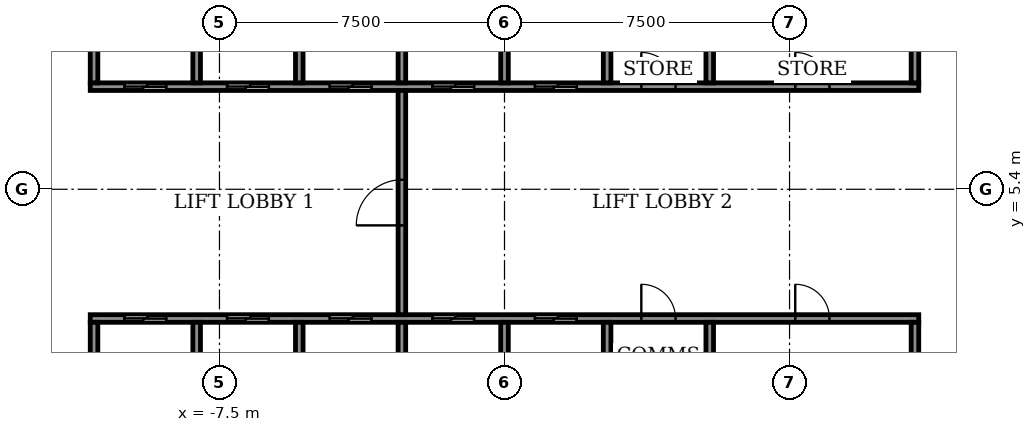
"""IFC4 building model, lengths in metres.
Left out: names, types, materials, properties, quantities, classifications, styles, units other than length and angle.
Written with IfcOpenShell. Run it as: python <this file> out.ifc"""

import sys

from ifc_helpers import new_model, si_unit, direction, frame, frame_2d, origin, place, context, subcontext, project, spatial, rectangle, extrude, element, fill, save


model = new_model("IFC4")
c1 = context("Model", 3, precision=1e-05, world=origin(), true_north=direction((0.0, 1.0)))
c2 = subcontext(c1, "Body", "Model", "MODEL_VIEW")
j1 = project(units=[si_unit("LENGTHUNIT", "METRE"), si_unit("PLANEANGLEUNIT", "RADIAN")], contexts=[c1])
p1 = place(None, origin())
s1 = spatial("IfcSite", under=j1, at=p1, CompositionType="ELEMENT")
p2 = place(p1, origin())
s2 = spatial("IfcBuilding", under=s1, at=p2, CompositionType="ELEMENT")
p3 = place(p2, frame((0.0, 0.0, 6.0)))
s3 = spatial("IfcBuildingStorey", under=s2, at=p3, CompositionType="ELEMENT", Elevation=6.0)
p4 = place(p3, frame((-10.9, 2.0, 0.0), z_axis=(0.0, 0.0, 1.0), x_axis=(1.0, 0.0, 0.0)))
e1 = element("IfcWall", 1, at=p4, inside=s3, PredefinedType="SHEAR", context=c2, shape_type="SweptSolid", body=[
    extrude(rectangle(XDim=21.8, YDim=0.2, at=frame_2d((10.9, 0.0))), origin(), (0.0, 0.0, 1.0), 4.45),
])
p5 = place(p4, frame((0.9, 0.0, 0.0)))
e2 = element("IfcOpeningElement", 2, at=p5, cuts=e1, PredefinedType="OPENING", context=c2, shape_type="SweptSolid", body=[
    extrude(rectangle(XDim=1.1, YDim=2.1, at=frame_2d((0.55, 1.05))), frame((0.0, 0.11, 0.0), z_axis=(0.0, -1.0, 0.0), x_axis=(1.0, 0.0, 0.0)), (0.0, 0.0, 1.0), 0.22),
])
p6 = place(p4, frame((3.6, 0.0, 0.0)))
e3 = element("IfcOpeningElement", 3, at=p6, cuts=e1, PredefinedType="OPENING", context=c2, shape_type="SweptSolid", body=[
    extrude(rectangle(XDim=1.1, YDim=2.1, at=frame_2d((0.55, 1.05))), frame((0.0, 0.11, 0.0), z_axis=(0.0, -1.0, 0.0), x_axis=(1.0, 0.0, 0.0)), (0.0, 0.0, 1.0), 0.22),
])
p7 = place(p4, frame((6.3, 0.0, 0.0)))
e4 = element("IfcOpeningElement", 4, at=p7, cuts=e1, PredefinedType="OPENING", context=c2, shape_type="SweptSolid", body=[
    extrude(rectangle(XDim=1.1, YDim=2.1, at=frame_2d((0.55, 1.05))), frame((0.0, 0.11, 0.0), z_axis=(0.0, -1.0, 0.0), x_axis=(1.0, 0.0, 0.0)), (0.0, 0.0, 1.0), 0.22),
])
p8 = place(p4, frame((9.0, 0.0, 0.0)))
e5 = element("IfcOpeningElement", 5, at=p8, cuts=e1, PredefinedType="OPENING", context=c2, shape_type="SweptSolid", body=[
    extrude(rectangle(XDim=1.1, YDim=2.1, at=frame_2d((0.55, 1.05))), frame((0.0, 0.11, 0.0), z_axis=(0.0, -1.0, 0.0), x_axis=(1.0, 0.0, 0.0)), (0.0, 0.0, 1.0), 0.22),
])
p9 = place(p4, frame((11.7, 0.0, 0.0)))
e6 = element("IfcOpeningElement", 6, at=p9, cuts=e1, PredefinedType="OPENING", context=c2, shape_type="SweptSolid", body=[
    extrude(rectangle(XDim=1.1, YDim=2.1, at=frame_2d((0.55, 1.05))), frame((0.0, 0.11, 0.0), z_axis=(0.0, -1.0, 0.0), x_axis=(1.0, 0.0, 0.0)), (0.0, 0.0, 1.0), 0.22),
])
p10 = place(p4, frame((14.5, 0.0, 0.0)))
e7 = element("IfcOpeningElement", 7, at=p10, cuts=e1, PredefinedType="OPENING", context=c2, shape_type="SweptSolid", body=[
    extrude(rectangle(XDim=0.9, YDim=2.1, at=frame_2d((0.45, 1.05))), frame((0.0, 0.11, 0.0), z_axis=(0.0, -1.0, 0.0), x_axis=(1.0, 0.0, 0.0)), (0.0, 0.0, 1.0), 0.22),
])
p11 = place(p4, frame((18.55, 0.0, 0.0)))
e8 = element("IfcOpeningElement", 8, at=p11, cuts=e1, PredefinedType="OPENING", context=c2, shape_type="SweptSolid", body=[
    extrude(rectangle(XDim=0.9, YDim=2.1, at=frame_2d((0.45, 1.05))), frame((0.0, 0.11, 0.0), z_axis=(0.0, -1.0, 0.0), x_axis=(1.0, 0.0, 0.0)), (0.0, 0.0, 1.0), 0.22),
])
p12 = place(p3, frame((-10.9, 8.1, 0.0), z_axis=(0.0, 0.0, 1.0), x_axis=(1.0, 0.0, 0.0)))
e9 = element("IfcWall", 9, at=p12, inside=s3, PredefinedType="SHEAR", context=c2, shape_type="SweptSolid", body=[
    extrude(rectangle(XDim=21.8, YDim=0.2, at=frame_2d((10.9, 0.0))), origin(), (0.0, 0.0, 1.0), 4.45),
])
p13 = place(p12, frame((0.9, 0.0, 0.0)))
e10 = element("IfcOpeningElement", 10, at=p13, cuts=e9, PredefinedType="OPENING", context=c2, shape_type="SweptSolid", body=[
    extrude(rectangle(XDim=1.1, YDim=2.1, at=frame_2d((0.55, 1.05))), frame((0.0, 0.11, 0.0), z_axis=(0.0, -1.0, 0.0), x_axis=(1.0, 0.0, 0.0)), (0.0, 0.0, 1.0), 0.22),
])
p14 = place(p12, frame((3.6, 0.0, 0.0)))
e11 = element("IfcOpeningElement", 11, at=p14, cuts=e9, PredefinedType="OPENING", context=c2, shape_type="SweptSolid", body=[
    extrude(rectangle(XDim=1.1, YDim=2.1, at=frame_2d((0.55, 1.05))), frame((0.0, 0.11, 0.0), z_axis=(0.0, -1.0, 0.0), x_axis=(1.0, 0.0, 0.0)), (0.0, 0.0, 1.0), 0.22),
])
p15 = place(p12, frame((6.3, 0.0, 0.0)))
e12 = element("IfcOpeningElement", 12, at=p15, cuts=e9, PredefinedType="OPENING", context=c2, shape_type="SweptSolid", body=[
    extrude(rectangle(XDim=1.1, YDim=2.1, at=frame_2d((0.55, 1.05))), frame((0.0, 0.11, 0.0), z_axis=(0.0, -1.0, 0.0), x_axis=(1.0, 0.0, 0.0)), (0.0, 0.0, 1.0), 0.22),
])
p16 = place(p12, frame((9.0, 0.0, 0.0)))
e13 = element("IfcOpeningElement", 13, at=p16, cuts=e9, PredefinedType="OPENING", context=c2, shape_type="SweptSolid", body=[
    extrude(rectangle(XDim=1.1, YDim=2.1, at=frame_2d((0.55, 1.05))), frame((0.0, 0.11, 0.0), z_axis=(0.0, -1.0, 0.0), x_axis=(1.0, 0.0, 0.0)), (0.0, 0.0, 1.0), 0.22),
])
p17 = place(p12, frame((11.7, 0.0, 0.0)))
e14 = element("IfcOpeningElement", 14, at=p17, cuts=e9, PredefinedType="OPENING", context=c2, shape_type="SweptSolid", body=[
    extrude(rectangle(XDim=1.1, YDim=2.1, at=frame_2d((0.55, 1.05))), frame((0.0, 0.11, 0.0), z_axis=(0.0, -1.0, 0.0), x_axis=(1.0, 0.0, 0.0)), (0.0, 0.0, 1.0), 0.22),
])
p18 = place(p12, frame((14.5, 0.0, 0.0)))
e15 = element("IfcOpeningElement", 15, at=p18, cuts=e9, PredefinedType="OPENING", context=c2, shape_type="SweptSolid", body=[
    extrude(rectangle(XDim=0.9, YDim=2.1, at=frame_2d((0.45, 1.05))), frame((0.0, 0.11, 0.0), z_axis=(0.0, -1.0, 0.0), x_axis=(1.0, 0.0, 0.0)), (0.0, 0.0, 1.0), 0.22),
])
p19 = place(p12, frame((18.55, 0.0, 0.0)))
e16 = element("IfcOpeningElement", 16, at=p19, cuts=e9, PredefinedType="OPENING", context=c2, shape_type="SweptSolid", body=[
    extrude(rectangle(XDim=0.9, YDim=2.1, at=frame_2d((0.45, 1.05))), frame((0.0, 0.11, 0.0), z_axis=(0.0, -1.0, 0.0), x_axis=(1.0, 0.0, 0.0)), (0.0, 0.0, 1.0), 0.22),
])
for number, where, z_axis, x_axis in (
    (17, (-10.8, -0.6, 0.0), (0.0, 0.0, 1.0), (0.0, 1.0, 0.0)),
    (18, (-8.1, -0.6, 0.0), (0.0, 0.0, 1.0), (0.0, 1.0, 0.0)),
    (19, (-5.4, -0.6, 0.0), (0.0, 0.0, 1.0), (0.0, 1.0, 0.0)),
    (20, (-2.7, -0.6, 0.0), (0.0, 0.0, 1.0), (0.0, 1.0, 0.0)),
    (21, (0.0, -0.6, 0.0), (0.0, 0.0, 1.0), (0.0, 1.0, 0.0)),
    (22, (2.7, -0.6, 0.0), (0.0, 0.0, 1.0), (0.0, 1.0, 0.0)),
):
    element("IfcWall", number, at=place(p3, frame(where, z_axis=z_axis, x_axis=x_axis)), inside=s3, PredefinedType="SHEAR", context=c2, shape_type="SweptSolid", body=[
        extrude(rectangle(XDim=2.5, YDim=0.2, at=frame_2d((1.25, 0.0))), origin(), (0.0, 0.0, 1.0), 4.45),
    ])
for number, where, z_axis, x_axis in (
    (23, (5.4, -0.6, 0.0), (0.0, 0.0, 1.0), (0.0, 1.0, 0.0)),
    (24, (10.8, -0.6, 0.0), (0.0, 0.0, 1.0), (0.0, 1.0, 0.0)),
):
    element("IfcWall", number, at=place(p3, frame(where, z_axis=z_axis, x_axis=x_axis)), inside=s3, PredefinedType="STANDARD", context=c2, shape_type="SweptSolid", body=[
        extrude(rectangle(XDim=2.5, YDim=0.2, at=frame_2d((1.25, 0.0))), origin(), (0.0, 0.0, 1.0), 4.45),
    ])
for number, where, z_axis, x_axis in (
    (25, (-10.8, 8.2, 0.0), (0.0, 0.0, 1.0), (0.0, 1.0, 0.0)),
    (26, (-8.1, 8.2, 0.0), (0.0, 0.0, 1.0), (0.0, 1.0, 0.0)),
    (27, (-5.4, 8.2, 0.0), (0.0, 0.0, 1.0), (0.0, 1.0, 0.0)),
    (28, (-2.7, 8.2, 0.0), (0.0, 0.0, 1.0), (0.0, 1.0, 0.0)),
    (29, (0.0, 8.2, 0.0), (0.0, 0.0, 1.0), (0.0, 1.0, 0.0)),
    (30, (2.7, 8.2, 0.0), (0.0, 0.0, 1.0), (0.0, 1.0, 0.0)),
):
    element("IfcWall", number, at=place(p3, frame(where, z_axis=z_axis, x_axis=x_axis)), inside=s3, PredefinedType="SHEAR", context=c2, shape_type="SweptSolid", body=[
        extrude(rectangle(XDim=2.6, YDim=0.2, at=frame_2d((1.3, 0.0))), origin(), (0.0, 0.0, 1.0), 4.45),
    ])
for number, where, z_axis, x_axis in (
    (31, (5.4, 8.2, 0.0), (0.0, 0.0, 1.0), (0.0, 1.0, 0.0)),
    (32, (10.8, 8.2, 0.0), (0.0, 0.0, 1.0), (0.0, 1.0, 0.0)),
):
    element("IfcWall", number, at=place(p3, frame(where, z_axis=z_axis, x_axis=x_axis)), inside=s3, PredefinedType="STANDARD", context=c2, shape_type="SweptSolid", body=[
        extrude(rectangle(XDim=2.6, YDim=0.2, at=frame_2d((1.3, 0.0))), origin(), (0.0, 0.0, 1.0), 4.45),
    ])
p20 = place(p3, frame((-2.7, 2.1, 0.0), z_axis=(0.0, 0.0, 1.0), x_axis=(0.0, 1.0, 0.0)))
e33 = element("IfcWall", 33, at=p20, inside=s3, PredefinedType="STANDARD", context=c2, shape_type="SweptSolid", body=[
    extrude(rectangle(XDim=5.9, YDim=0.2, at=frame_2d((2.95, 0.0))), origin(), (0.0, 0.0, 1.0), 4.45),
])
p21 = place(p20, frame((2.35, 0.0, 0.0)))
e34 = element("IfcOpeningElement", 34, at=p21, cuts=e33, PredefinedType="OPENING", context=c2, shape_type="SweptSolid", body=[
    extrude(rectangle(XDim=1.2, YDim=2.1, at=frame_2d((0.6, 1.05))), frame((0.0, 0.11, 0.0), z_axis=(0.0, -1.0, 0.0), x_axis=(1.0, 0.0, 0.0)), (0.0, 0.0, 1.0), 0.22),
])
p22 = place(p5, origin())
e35 = element("IfcDoor", 35, at=p22, inside=s3, OperationType="SLIDING_TO_LEFT", PredefinedType="DOOR", context=c2, shape_type="SweptSolid", body=[
    extrude(rectangle(XDim=1.1, YDim=2.1, at=frame_2d((0.55, 1.05))), frame((0.0, 0.025, 0.0), z_axis=(0.0, -1.0, 0.0), x_axis=(1.0, 0.0, 0.0)), (0.0, 0.0, 1.0), 0.05),
])
fill(e2, e35)
p23 = place(p6, origin())
e36 = element("IfcDoor", 36, at=p23, inside=s3, OperationType="SLIDING_TO_LEFT", PredefinedType="DOOR", context=c2, shape_type="SweptSolid", body=[
    extrude(rectangle(XDim=1.1, YDim=2.1, at=frame_2d((0.55, 1.05))), frame((0.0, 0.025, 0.0), z_axis=(0.0, -1.0, 0.0), x_axis=(1.0, 0.0, 0.0)), (0.0, 0.0, 1.0), 0.05),
])
fill(e3, e36)
p24 = place(p7, origin())
e37 = element("IfcDoor", 37, at=p24, inside=s3, OperationType="SLIDING_TO_LEFT", PredefinedType="DOOR", context=c2, shape_type="SweptSolid", body=[
    extrude(rectangle(XDim=1.1, YDim=2.1, at=frame_2d((0.55, 1.05))), frame((0.0, 0.025, 0.0), z_axis=(0.0, -1.0, 0.0), x_axis=(1.0, 0.0, 0.0)), (0.0, 0.0, 1.0), 0.05),
])
fill(e4, e37)
p25 = place(p8, origin())
e38 = element("IfcDoor", 38, at=p25, inside=s3, OperationType="SLIDING_TO_LEFT", PredefinedType="DOOR", context=c2, shape_type="SweptSolid", body=[
    extrude(rectangle(XDim=1.1, YDim=2.1, at=frame_2d((0.55, 1.05))), frame((0.0, 0.025, 0.0), z_axis=(0.0, -1.0, 0.0), x_axis=(1.0, 0.0, 0.0)), (0.0, 0.0, 1.0), 0.05),
])
fill(e5, e38)
p26 = place(p9, origin())
e39 = element("IfcDoor", 39, at=p26, inside=s3, OperationType="SLIDING_TO_LEFT", PredefinedType="DOOR", context=c2, shape_type="SweptSolid", body=[
    extrude(rectangle(XDim=1.1, YDim=2.1, at=frame_2d((0.55, 1.05))), frame((0.0, 0.025, 0.0), z_axis=(0.0, -1.0, 0.0), x_axis=(1.0, 0.0, 0.0)), (0.0, 0.0, 1.0), 0.05),
])
fill(e6, e39)
p27 = place(p13, origin())
e40 = element("IfcDoor", 40, at=p27, inside=s3, OperationType="SLIDING_TO_LEFT", PredefinedType="DOOR", context=c2, shape_type="SweptSolid", body=[
    extrude(rectangle(XDim=1.1, YDim=2.1, at=frame_2d((0.55, 1.05))), frame((0.0, 0.025, 0.0), z_axis=(0.0, -1.0, 0.0), x_axis=(1.0, 0.0, 0.0)), (0.0, 0.0, 1.0), 0.05),
])
fill(e10, e40)
p28 = place(p14, origin())
e41 = element("IfcDoor", 41, at=p28, inside=s3, OperationType="SLIDING_TO_LEFT", PredefinedType="DOOR", context=c2, shape_type="SweptSolid", body=[
    extrude(rectangle(XDim=1.1, YDim=2.1, at=frame_2d((0.55, 1.05))), frame((0.0, 0.025, 0.0), z_axis=(0.0, -1.0, 0.0), x_axis=(1.0, 0.0, 0.0)), (0.0, 0.0, 1.0), 0.05),
])
fill(e11, e41)
p29 = place(p15, origin())
e42 = element("IfcDoor", 42, at=p29, inside=s3, OperationType="SLIDING_TO_LEFT", PredefinedType="DOOR", context=c2, shape_type="SweptSolid", body=[
    extrude(rectangle(XDim=1.1, YDim=2.1, at=frame_2d((0.55, 1.05))), frame((0.0, 0.025, 0.0), z_axis=(0.0, -1.0, 0.0), x_axis=(1.0, 0.0, 0.0)), (0.0, 0.0, 1.0), 0.05),
])
fill(e12, e42)
p30 = place(p16, origin())
e43 = element("IfcDoor", 43, at=p30, inside=s3, OperationType="SLIDING_TO_LEFT", PredefinedType="DOOR", context=c2, shape_type="SweptSolid", body=[
    extrude(rectangle(XDim=1.1, YDim=2.1, at=frame_2d((0.55, 1.05))), frame((0.0, 0.025, 0.0), z_axis=(0.0, -1.0, 0.0), x_axis=(1.0, 0.0, 0.0)), (0.0, 0.0, 1.0), 0.05),
])
fill(e13, e43)
p31 = place(p17, origin())
e44 = element("IfcDoor", 44, at=p31, inside=s3, OperationType="SLIDING_TO_LEFT", PredefinedType="DOOR", context=c2, shape_type="SweptSolid", body=[
    extrude(rectangle(XDim=1.1, YDim=2.1, at=frame_2d((0.55, 1.05))), frame((0.0, 0.025, 0.0), z_axis=(0.0, -1.0, 0.0), x_axis=(1.0, 0.0, 0.0)), (0.0, 0.0, 1.0), 0.05),
])
fill(e14, e44)
p32 = place(p10, origin())
e45 = element("IfcDoor", 45, at=p32, inside=s3, OperationType="SINGLE_SWING_LEFT", PredefinedType="DOOR", context=c2, shape_type="SweptSolid", body=[
    extrude(rectangle(XDim=0.9, YDim=2.1, at=frame_2d((0.45, 1.05))), frame((0.0, 0.025, 0.0), z_axis=(0.0, -1.0, 0.0), x_axis=(1.0, 0.0, 0.0)), (0.0, 0.0, 1.0), 0.05),
])
fill(e7, e45)
p33 = place(p11, origin())
e46 = element("IfcDoor", 46, at=p33, inside=s3, OperationType="SINGLE_SWING_RIGHT", PredefinedType="DOOR", context=c2, shape_type="SweptSolid", body=[
    extrude(rectangle(XDim=0.9, YDim=2.1, at=frame_2d((0.45, 1.05))), frame((0.0, 0.025, 0.0), z_axis=(0.0, -1.0, 0.0), x_axis=(1.0, 0.0, 0.0)), (0.0, 0.0, 1.0), 0.05),
])
fill(e8, e46)
p34 = place(p18, origin())
e47 = element("IfcDoor", 47, at=p34, inside=s3, OperationType="SINGLE_SWING_RIGHT", PredefinedType="DOOR", context=c2, shape_type="SweptSolid", body=[
    extrude(rectangle(XDim=0.9, YDim=2.1, at=frame_2d((0.45, 1.05))), frame((0.0, 0.025, 0.0), z_axis=(0.0, -1.0, 0.0), x_axis=(1.0, 0.0, 0.0)), (0.0, 0.0, 1.0), 0.05),
])
fill(e15, e47)
p35 = place(p19, origin())
e48 = element("IfcDoor", 48, at=p35, inside=s3, OperationType="SINGLE_SWING_RIGHT", PredefinedType="DOOR", context=c2, shape_type="SweptSolid", body=[
    extrude(rectangle(XDim=0.9, YDim=2.1, at=frame_2d((0.45, 1.05))), frame((0.0, 0.025, 0.0), z_axis=(0.0, -1.0, 0.0), x_axis=(1.0, 0.0, 0.0)), (0.0, 0.0, 1.0), 0.05),
])
fill(e16, e48)
p36 = place(p21, origin())
e49 = element("IfcDoor", 49, at=p36, inside=s3, OperationType="SINGLE_SWING_LEFT", PredefinedType="DOOR", context=c2, shape_type="SweptSolid", body=[
    extrude(rectangle(XDim=1.2, YDim=2.1, at=frame_2d((0.6, 1.05))), frame((0.0, 0.025, 0.0), z_axis=(0.0, -1.0, 0.0), x_axis=(1.0, 0.0, 0.0)), (0.0, 0.0, 1.0), 0.05),
])
fill(e34, e49)
save(model, sys.argv[1])
